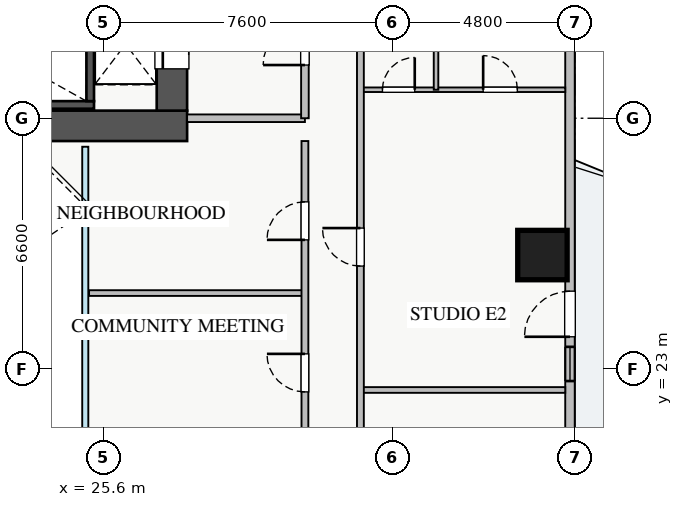
"""IFC4 building model, lengths in metres.
Left out: names, types, materials, properties, quantities, classifications, styles, units other than length and angle.
Written with IfcOpenShell. Run it as: python <this file> out.ifc"""

import sys

from ifc_helpers import new_model, si_unit, direction, frame, frame_2d, origin, origin_2d, place, context, subcontext, project, spatial, rectangle, extrude, source, transform, mapped, element, fill, save


model = new_model("IFC4")
c1 = context("Model", 3, precision=1e-05, world=origin(), true_north=direction((0.0, 1.0)))
c2 = subcontext(c1, "Body", "Model", "MODEL_VIEW")
j1 = project(units=[si_unit("LENGTHUNIT", "METRE"), si_unit("PLANEANGLEUNIT", "RADIAN")], contexts=[c1])
p1 = place(None, origin())
s1 = spatial("IfcSite", under=j1, at=p1, CompositionType="ELEMENT")
p2 = place(p1, origin())
s2 = spatial("IfcBuilding", under=s1, at=p2, CompositionType="ELEMENT")
p3 = place(p2, frame((0.0, 0.0, 66.5)))
s3 = spatial("IfcBuildingStorey", under=s2, at=p3, CompositionType="ELEMENT", Elevation=66.5)
p4 = place(p3, frame((18.2, 29.95, 0.0), z_axis=(0.0, 0.0, 1.0), x_axis=(1.0, 0.0, 0.0)))
e1 = element("IfcWall", 1, at=p4, inside=s3, PredefinedType="SHEAR", context=c2, shape_type="SweptSolid", body=[
    extrude(rectangle(XDim=7.15, YDim=0.2, at=frame_2d((3.575, 0.0))), origin(), (0.0, 0.0, 1.0), 3.25),
])
p5 = place(p3, frame((25.25, 30.05, 0.0), z_axis=(0.0, 0.0, 1.0), x_axis=(0.0, 1.0, 0.0)))
e2 = element("IfcWall", 2, at=p5, inside=s3, PredefinedType="SHEAR", context=c2, shape_type="SweptSolid", body=[
    extrude(rectangle(XDim=2.94, YDim=0.2, at=frame_2d((1.47, 0.0))), origin(), (0.0, 0.0, 1.0), 3.25),
])
p6 = place(p3, frame((10.2, 29.4, 0.0), z_axis=(0.0, 0.0, 1.0), x_axis=(1.0, 0.0, 0.0)))
e3 = element("IfcWall", 3, at=p6, inside=s3, PredefinedType="SHEAR", context=c2, shape_type="SweptSolid", body=[
    extrude(rectangle(XDim=17.6, YDim=0.8, at=frame_2d((8.8, 0.0))), origin(), (0.0, 0.0, 1.0), 3.25),
])
p7 = place(p3, frame((27.4, 29.8, 0.0), z_axis=(0.0, 0.0, 1.0), x_axis=(0.0, 1.0, 0.0)))
e4 = element("IfcWall", 4, at=p7, inside=s3, PredefinedType="SHEAR", context=c2, shape_type="SweptSolid", body=[
    extrude(rectangle(XDim=5.6, YDim=0.8, at=frame_2d((2.8, 0.0))), origin(), (0.0, 0.0, 1.0), 3.25),
])
p8 = place(p7, frame((1.1, 0.0, 0.0)))
e5 = element("IfcOpeningElement", 5, at=p8, cuts=e4, PredefinedType="OPENING", context=c2, shape_type="SweptSolid", body=[
    extrude(rectangle(XDim=1.3, YDim=2.05, at=frame_2d((0.65, 1.025))), frame((0.0, 0.41, 0.0), z_axis=(0.0, -1.0, 0.0), x_axis=(1.0, 0.0, 0.0)), (0.0, 0.0, 1.0), 0.82),
])
m1 = source(origin(), c2, "Body", "SweptSolid", [
    extrude(rectangle(XDim=1.3, YDim=1.3, at=origin_2d()), origin(), (0.0, 0.0, 1.0), 3.25),
])
p9 = place(p3, frame((37.15, 26.0, 0.0), z_axis=(0.0, 0.0, 1.0), x_axis=(1.0, 0.0, 0.0)))
e6 = element("IfcColumn", 6, at=p9, inside=s3, PredefinedType="COLUMN", context=c2, shape_type="MappedRepresentation", body=[
    mapped(m1, transform((0.0, 0.0, 0.0), x_axis=(1.0, 0.0, 0.0), y_axis=(0.0, 1.0, 0.0), z_axis=(0.0, 0.0, 1.0), scale=1.0)),
])
p10 = place(p3, frame((37.875, 9.45, 0.0), z_axis=(0.0, 0.0, 1.0), x_axis=(0.0, 1.0, 0.0)))
e7 = element("IfcWall", 7, at=p10, inside=s3, PredefinedType="STANDARD", context=c2, shape_type="SweptSolid", body=[
    extrude(rectangle(XDim=27.1, YDim=0.25, at=frame_2d((13.55, 0.0))), origin(), (0.0, 0.0, 1.0), 2.61),
])
p11 = place(p10, frame((14.4, 0.0, 0.0)))
e8 = element("IfcOpeningElement", 8, at=p11, cuts=e7, PredefinedType="OPENING", context=c2, shape_type="SweptSolid", body=[
    extrude(rectangle(XDim=1.2, YDim=2.1, at=frame_2d((0.6, 1.05))), frame((0.0, 0.135, 0.0), z_axis=(0.0, -1.0, 0.0), x_axis=(1.0, 0.0, 0.0)), (0.0, 0.0, 1.0), 0.27),
])
p12 = place(p10, frame((2.188, 0.0, 0.9)))
e9 = element("IfcOpeningElement", 9, at=p12, cuts=e7, PredefinedType="OPENING", context=c2, shape_type="SweptSolid", body=[
    extrude(rectangle(XDim=2.4, YDim=1.48, at=frame_2d((1.2, 0.74))), frame((0.0, 0.135, 0.0), z_axis=(0.0, -1.0, 0.0), x_axis=(1.0, 0.0, 0.0)), (0.0, 0.0, 1.0), 0.27),
])
p13 = place(p10, frame((22.663, 0.0, 0.9)))
e10 = element("IfcOpeningElement", 10, at=p13, cuts=e7, PredefinedType="OPENING", context=c2, shape_type="SweptSolid", body=[
    extrude(rectangle(XDim=2.1, YDim=1.48, at=frame_2d((1.05, 0.74))), frame((0.0, 0.135, 0.0), z_axis=(0.0, -1.0, 0.0), x_axis=(1.0, 0.0, 0.0)), (0.0, 0.0, 1.0), 0.27),
])
p14 = place(p10, frame((13.235, 0.0, 0.9)))
e11 = element("IfcOpeningElement", 11, at=p14, cuts=e7, PredefinedType="OPENING", context=c2, shape_type="SweptSolid", body=[
    extrude(rectangle(XDim=0.9, YDim=1.2, at=frame_2d((0.45, 0.6))), frame((0.0, 0.135, 0.0), z_axis=(0.0, -1.0, 0.0), x_axis=(1.0, 0.0, 0.0)), (0.0, 0.0, 1.0), 0.27),
])
p15 = place(p3, frame((27.8, 29.6, 0.0), z_axis=(0.0, 0.0, 1.0), x_axis=(1.0, 0.0, 0.0)))
e12 = element("IfcWall", 12, at=p15, inside=s3, PredefinedType="PARTITIONING", context=c2, shape_type="SweptSolid", body=[
    extrude(rectangle(XDim=3.1, YDim=0.2, at=frame_2d((1.55, 0.0))), origin(), (0.0, 0.0, 1.0), 3.07),
])
p16 = place(p3, frame((30.9, 29.6, 0.0), z_axis=(0.0, 0.0, 1.0), x_axis=(0.0, 1.0, 0.0)))
e13 = element("IfcWall", 13, at=p16, inside=s3, PredefinedType="PARTITIONING", context=c2, shape_type="SweptSolid", body=[
    extrude(rectangle(XDim=3.9, YDim=0.2, at=frame_2d((1.95, 0.0))), origin(), (0.0, 0.0, 1.0), 3.07),
])
p17 = place(p16, frame((1.4, 0.0, 0.0)))
e14 = element("IfcOpeningElement", 14, at=p17, cuts=e13, PredefinedType="OPENING", context=c2, shape_type="SweptSolid", body=[
    extrude(rectangle(XDim=1.1, YDim=2.05, at=frame_2d((0.55, 1.025))), frame((0.0, 0.11, 0.0), z_axis=(0.0, -1.0, 0.0), x_axis=(1.0, 0.0, 0.0)), (0.0, 0.0, 1.0), 0.22),
])
p18 = place(p3, frame((32.36, 30.35, 0.0), z_axis=(0.0, 0.0, 1.0), x_axis=(1.0, 0.0, 0.0)))
e15 = element("IfcWall", 15, at=p18, inside=s3, PredefinedType="PLUMBINGWALL", context=c2, shape_type="SweptSolid", body=[
    extrude(rectangle(XDim=5.39, YDim=0.12, at=frame_2d((2.695, 0.0))), origin(), (0.0, 0.0, 1.0), 3.07),
])
p19 = place(p18, frame((0.58, 0.0, 0.0)))
e16 = element("IfcOpeningElement", 16, at=p19, cuts=e15, PredefinedType="OPENING", context=c2, shape_type="SweptSolid", body=[
    extrude(rectangle(XDim=0.85, YDim=2.05, at=frame_2d((0.425, 1.025))), frame((0.0, 0.07, 0.0), z_axis=(0.0, -1.0, 0.0), x_axis=(1.0, 0.0, 0.0)), (0.0, 0.0, 1.0), 0.14),
])
p20 = place(p18, frame((3.23, 0.0, 0.0)))
e17 = element("IfcOpeningElement", 17, at=p20, cuts=e15, PredefinedType="OPENING", context=c2, shape_type="SweptSolid", body=[
    extrude(rectangle(XDim=0.9, YDim=2.05, at=frame_2d((0.45, 1.025))), frame((0.0, 0.07, 0.0), z_axis=(0.0, -1.0, 0.0), x_axis=(1.0, 0.0, 0.0)), (0.0, 0.0, 1.0), 0.14),
])
p21 = place(p3, frame((34.35, 30.35, 0.0), z_axis=(0.0, 0.0, 1.0), x_axis=(0.0, 1.0, 0.0)))
e18 = element("IfcWall", 18, at=p21, inside=s3, PredefinedType="PLUMBINGWALL", context=c2, shape_type="SweptSolid", body=[
    extrude(rectangle(XDim=6.73, YDim=0.12, at=frame_2d((3.365, 0.0))), origin(), (0.0, 0.0, 1.0), 3.07),
])
p22 = place(p3, frame((32.36, 22.45, 0.0), z_axis=(0.0, 0.0, 1.0), x_axis=(1.0, 0.0, 0.0)))
e19 = element("IfcWall", 19, at=p22, inside=s3, PredefinedType="PARTITIONING", context=c2, shape_type="SweptSolid", body=[
    extrude(rectangle(XDim=5.39, YDim=0.15, at=frame_2d((2.695, 0.0))), origin(), (0.0, 0.0, 1.0), 3.07),
])
p23 = place(p3, frame((32.36, 7.21, 0.0), z_axis=(0.0, 0.0, 1.0), x_axis=(0.0, 1.0, 0.0)))
e20 = element("IfcWall", 20, at=p23, inside=s3, PredefinedType="PARTITIONING", context=c2, shape_type="SweptSolid", body=[
    extrude(rectangle(XDim=31.23, YDim=0.18, at=frame_2d((15.615, 0.0))), origin(), (0.0, 0.0, 1.0), 2.715),
])
p24 = place(p23, frame((30.09, 0.0, 0.0)))
e21 = element("IfcOpeningElement", 21, at=p24, cuts=e20, PredefinedType="OPENING", context=c2, shape_type="SweptSolid", body=[
    extrude(rectangle(XDim=0.9, YDim=2.05, at=frame_2d((0.45, 1.025))), frame((0.0, 0.1, 0.0), z_axis=(0.0, -1.0, 0.0), x_axis=(1.0, 0.0, 0.0)), (0.0, 0.0, 1.0), 0.2),
])
p25 = place(p23, frame((0.415, 0.0, 0.0)))
e22 = element("IfcOpeningElement", 22, at=p25, cuts=e20, PredefinedType="OPENING", context=c2, shape_type="SweptSolid", body=[
    extrude(rectangle(XDim=0.9, YDim=2.05, at=frame_2d((0.45, 1.025))), frame((0.0, 0.1, 0.0), z_axis=(0.0, -1.0, 0.0), x_axis=(1.0, 0.0, 0.0)), (0.0, 0.0, 1.0), 0.2),
])
p26 = place(p23, frame((7.975, 0.0, 0.0)))
e23 = element("IfcOpeningElement", 23, at=p26, cuts=e20, PredefinedType="OPENING", context=c2, shape_type="SweptSolid", body=[
    extrude(rectangle(XDim=1.0, YDim=2.05, at=frame_2d((0.5, 1.025))), frame((0.0, 0.1, 0.0), z_axis=(0.0, -1.0, 0.0), x_axis=(1.0, 0.0, 0.0)), (0.0, 0.0, 1.0), 0.2),
])
p27 = place(p23, frame((18.5, 0.0, 0.0)))
e24 = element("IfcOpeningElement", 24, at=p27, cuts=e20, PredefinedType="OPENING", context=c2, shape_type="SweptSolid", body=[
    extrude(rectangle(XDim=1.0, YDim=2.05, at=frame_2d((0.5, 1.025))), frame((0.0, 0.1, 0.0), z_axis=(0.0, -1.0, 0.0), x_axis=(1.0, 0.0, 0.0)), (0.0, 0.0, 1.0), 0.2),
])
p28 = place(p3, frame((25.22, 25.0, 0.0), z_axis=(0.0, 0.0, 1.0), x_axis=(1.0, 0.0, 0.0)))
e25 = element("IfcWall", 25, at=p28, inside=s3, PredefinedType="PARTITIONING", context=c2, shape_type="SweptSolid", body=[
    extrude(rectangle(XDim=5.68, YDim=0.15, at=frame_2d((2.84, 0.0))), origin(), (0.0, 0.0, 1.0), 3.07),
])
p29 = place(p3, frame((30.9, 17.0, 0.0), z_axis=(0.0, 0.0, 1.0), x_axis=(0.0, 1.0, 0.0)))
e26 = element("IfcWall", 26, at=p29, inside=s3, PredefinedType="PARTITIONING", context=c2, shape_type="SweptSolid", body=[
    extrude(rectangle(XDim=12.0, YDim=0.18, at=frame_2d((6.0, 0.0))), origin(), (0.0, 0.0, 1.0), 3.07),
])
p30 = place(p29, frame((1.4, 0.0, 0.0)))
e27 = element("IfcOpeningElement", 27, at=p30, cuts=e26, PredefinedType="OPENING", context=c2, shape_type="SweptSolid", body=[
    extrude(rectangle(XDim=1.0, YDim=2.05, at=frame_2d((0.5, 1.025))), frame((0.0, 0.1, 0.0), z_axis=(0.0, -1.0, 0.0), x_axis=(1.0, 0.0, 0.0)), (0.0, 0.0, 1.0), 0.2),
])
p31 = place(p29, frame((5.4, 0.0, 0.0)))
e28 = element("IfcOpeningElement", 28, at=p31, cuts=e26, PredefinedType="OPENING", context=c2, shape_type="SweptSolid", body=[
    extrude(rectangle(XDim=1.0, YDim=2.05, at=frame_2d((0.5, 1.025))), frame((0.0, 0.1, 0.0), z_axis=(0.0, -1.0, 0.0), x_axis=(1.0, 0.0, 0.0)), (0.0, 0.0, 1.0), 0.2),
])
p32 = place(p29, frame((9.4, 0.0, 0.0)))
e29 = element("IfcOpeningElement", 29, at=p32, cuts=e26, PredefinedType="OPENING", context=c2, shape_type="SweptSolid", body=[
    extrude(rectangle(XDim=1.0, YDim=2.05, at=frame_2d((0.5, 1.025))), frame((0.0, 0.1, 0.0), z_axis=(0.0, -1.0, 0.0), x_axis=(1.0, 0.0, 0.0)), (0.0, 0.0, 1.0), 0.2),
])
m2 = source(origin(), c2, "Body", "SweptSolid", [
    extrude(rectangle(XDim=1.2, YDim=2.1, at=frame_2d((0.6, 1.05))), frame((0.0, 0.025, 0.0), z_axis=(0.0, -1.0, 0.0), x_axis=(1.0, 0.0, 0.0)), (0.0, 0.0, 1.0), 0.05),
])
p33 = place(p11, origin())
e30 = element("IfcDoor", 30, at=p33, inside=s3, OperationType="SINGLE_SWING_LEFT", PredefinedType="DOOR", context=c2, shape_type="MappedRepresentation", body=[
    mapped(m2, transform((0.0, 0.0, 0.0), x_axis=(1.0, 0.0, 0.0), y_axis=(0.0, 1.0, 0.0), z_axis=(0.0, 0.0, 1.0), scale=1.0)),
])
fill(e8, e30)
m3 = source(origin(), c2, "Body", "SweptSolid", [
    extrude(rectangle(XDim=1.3, YDim=2.05, at=frame_2d((0.65, 1.025))), frame((0.0, 0.025, 0.0), z_axis=(0.0, -1.0, 0.0), x_axis=(1.0, 0.0, 0.0)), (0.0, 0.0, 1.0), 0.05),
])
p34 = place(p8, origin())
e31 = element("IfcDoor", 31, at=p34, inside=s3, OperationType="SLIDING_TO_LEFT", PredefinedType="DOOR", context=c2, shape_type="MappedRepresentation", body=[
    mapped(m3, transform((0.0, 0.0, 0.0), x_axis=(1.0, 0.0, 0.0), y_axis=(0.0, 1.0, 0.0), z_axis=(0.0, 0.0, 1.0), scale=1.0)),
])
fill(e5, e31)
m4 = source(origin(), c2, "Body", "SweptSolid", [
    extrude(rectangle(XDim=1.1, YDim=2.05, at=frame_2d((0.55, 1.025))), frame((0.0, 0.025, 0.0), z_axis=(0.0, -1.0, 0.0), x_axis=(1.0, 0.0, 0.0)), (0.0, 0.0, 1.0), 0.05),
])
p35 = place(p17, origin())
e32 = element("IfcDoor", 32, at=p35, inside=s3, OperationType="SINGLE_SWING_LEFT", PredefinedType="DOOR", context=c2, shape_type="MappedRepresentation", body=[
    mapped(m4, transform((0.0, 0.0, 0.0), x_axis=(1.0, 0.0, 0.0), y_axis=(0.0, 1.0, 0.0), z_axis=(0.0, 0.0, 1.0), scale=1.0)),
])
fill(e14, e32)
m5 = source(origin(), c2, "Body", "SweptSolid", [
    extrude(rectangle(XDim=0.85, YDim=2.05, at=frame_2d((0.425, 1.025))), frame((0.0, 0.025, 0.0), z_axis=(0.0, -1.0, 0.0), x_axis=(1.0, 0.0, 0.0)), (0.0, 0.0, 1.0), 0.05),
])
p36 = place(p19, origin())
e33 = element("IfcDoor", 33, at=p36, inside=s3, OperationType="SINGLE_SWING_RIGHT", PredefinedType="DOOR", context=c2, shape_type="MappedRepresentation", body=[
    mapped(m5, transform((0.0, 0.0, 0.0), x_axis=(1.0, 0.0, 0.0), y_axis=(0.0, 1.0, 0.0), z_axis=(0.0, 0.0, 1.0), scale=1.0)),
])
fill(e16, e33)
m6 = source(origin(), c2, "Body", "SweptSolid", [
    extrude(rectangle(XDim=0.9, YDim=2.05, at=frame_2d((0.45, 1.025))), frame((0.0, 0.025, 0.0), z_axis=(0.0, -1.0, 0.0), x_axis=(1.0, 0.0, 0.0)), (0.0, 0.0, 1.0), 0.05),
])
p37 = place(p20, origin())
e34 = element("IfcDoor", 34, at=p37, inside=s3, OperationType="SINGLE_SWING_LEFT", PredefinedType="DOOR", context=c2, shape_type="MappedRepresentation", body=[
    mapped(m6, transform((0.0, 0.0, 0.0), x_axis=(1.0, 0.0, 0.0), y_axis=(0.0, 1.0, 0.0), z_axis=(0.0, 0.0, 1.0), scale=1.0)),
])
fill(e17, e34)
m7 = source(origin(), c2, "Body", "SweptSolid", [
    extrude(rectangle(XDim=1.0, YDim=2.05, at=frame_2d((0.5, 1.025))), frame((0.0, 0.025, 0.0), z_axis=(0.0, -1.0, 0.0), x_axis=(1.0, 0.0, 0.0)), (0.0, 0.0, 1.0), 0.05),
])
p38 = place(p27, origin())
e35 = element("IfcDoor", 35, at=p38, inside=s3, OperationType="SINGLE_SWING_RIGHT", PredefinedType="DOOR", context=c2, shape_type="MappedRepresentation", body=[
    mapped(m7, transform((0.0, 0.0, 0.0), x_axis=(1.0, 0.0, 0.0), y_axis=(0.0, 1.0, 0.0), z_axis=(0.0, 0.0, 1.0), scale=1.0)),
])
fill(e24, e35)
p39 = place(p31, origin())
e36 = element("IfcDoor", 36, at=p39, inside=s3, OperationType="SINGLE_SWING_RIGHT", PredefinedType="DOOR", context=c2, shape_type="MappedRepresentation", body=[
    mapped(m7, transform((0.0, 0.0, 0.0), x_axis=(1.0, 0.0, 0.0), y_axis=(0.0, 1.0, 0.0), z_axis=(0.0, 0.0, 1.0), scale=1.0)),
])
fill(e28, e36)
p40 = place(p32, origin())
e37 = element("IfcDoor", 37, at=p40, inside=s3, OperationType="SINGLE_SWING_LEFT", PredefinedType="DOOR", context=c2, shape_type="MappedRepresentation", body=[
    mapped(m7, transform((0.0, 0.0, 0.0), x_axis=(1.0, 0.0, 0.0), y_axis=(0.0, 1.0, 0.0), z_axis=(0.0, 0.0, 1.0), scale=1.0)),
])
fill(e29, e37)
m8 = source(origin(), c2, "Body", "SweptSolid", [
    extrude(rectangle(XDim=0.9, YDim=1.2, at=frame_2d((0.45, 0.6))), frame((0.0, 0.03, 0.0), z_axis=(0.0, -1.0, 0.0), x_axis=(1.0, 0.0, 0.0)), (0.0, 0.0, 1.0), 0.06),
])
p41 = place(p14, origin())
e38 = element("IfcWindow", 38, at=p41, inside=s3, PartitioningType="SINGLE_PANEL", PredefinedType="WINDOW", context=c2, shape_type="MappedRepresentation", body=[
    mapped(m8, transform((0.0, 0.0, 0.0), x_axis=(1.0, 0.0, 0.0), y_axis=(0.0, 1.0, 0.0), z_axis=(0.0, 0.0, 1.0), scale=1.0)),
])
fill(e11, e38)
save(model, sys.argv[1])
